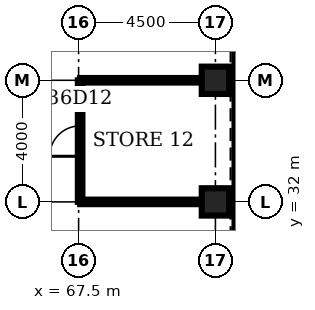
"""IFC4 building model, lengths in metres.
Left out: names, types, materials, properties, quantities, classifications, styles, units other than length and angle.
Written with IfcOpenShell. Run it as: python <this file> out.ifc"""

import sys

from ifc_helpers import new_model, si_unit, direction, frame, frame_2d, origin, origin_2d, place, context, subcontext, project, spatial, rectangle, hollow_rectangle, extrude, element, fill, save


model = new_model("IFC4")
c1 = context("Model", 3, precision=1e-05, world=origin(), true_north=direction((0.0, 1.0)))
c2 = subcontext(c1, "Body", "Model", "MODEL_VIEW")
j1 = project(units=[si_unit("LENGTHUNIT", "METRE"), si_unit("PLANEANGLEUNIT", "RADIAN")], contexts=[c1])
p1 = place(None, origin())
s1 = spatial("IfcSite", under=j1, at=p1, CompositionType="ELEMENT")
p2 = place(p1, origin())
s2 = spatial("IfcBuilding", under=s1, at=p2, CompositionType="ELEMENT")
p3 = place(p2, frame((0.0, 0.0, 163.5)))
s3 = spatial("IfcBuildingStorey", under=s2, at=p3, CompositionType="ELEMENT", Elevation=163.5)
for number, where, z_axis, x_axis in (
    (1, (72.0, 32.0, 0.0), (0.0, 0.0, 1.0), (1.0, 0.0, 0.0)),
    (2, (72.0, 36.0, 0.0), (0.0, 0.0, 1.0), (1.0, 0.0, 0.0)),
):
    element("IfcColumn", number, at=place(p3, frame(where, z_axis=z_axis, x_axis=x_axis)), inside=s3, PredefinedType="COLUMN", context=c2, shape_type="SweptSolid", body=[
        extrude(hollow_rectangle(XDim=0.9, YDim=0.9, WallThickness=0.09, at=origin_2d()), origin(), (0.0, 0.0, 1.0), 4.2),
    ])
for number, where, z_axis, x_axis in (
    (3, (67.55, 32.0, 0.0), (0.0, 0.0, 1.0), (1.0, 0.0, 0.0)),
    (4, (67.55, 36.0, 0.0), (0.0, 0.0, 1.0), (1.0, 0.0, 0.0)),
):
    element("IfcWall", number, at=place(p3, frame(where, z_axis=z_axis, x_axis=x_axis)), inside=s3, PredefinedType="PARTITIONING", context=c2, shape_type="SweptSolid", body=[
        extrude(rectangle(XDim=4.0, YDim=0.15, at=frame_2d((2.0, 0.0))), origin(), (0.0, 0.0, 1.0), 3.0),
    ])
p4 = place(p3, frame((67.55, 32.0, 0.0), z_axis=(0.0, 0.0, 1.0), x_axis=(0.0, 1.0, 0.0)))
e5 = element("IfcWall", 5, at=p4, inside=s3, PredefinedType="PARTITIONING", context=c2, shape_type="SweptSolid", body=[
    extrude(rectangle(XDim=4.0, YDim=0.15, at=frame_2d((2.0, 0.0))), origin(), (0.0, 0.0, 1.0), 3.0),
])
p5 = place(p4, frame((1.5, 0.0, 0.0)))
e6 = element("IfcOpeningElement", 6, at=p5, cuts=e5, PredefinedType="OPENING", context=c2, shape_type="SweptSolid", body=[
    extrude(rectangle(XDim=1.0, YDim=2.1, at=frame_2d((0.5, 1.05))), frame((0.0, 0.085, 0.0), z_axis=(0.0, -1.0, 0.0), x_axis=(1.0, 0.0, 0.0)), (0.0, 0.0, 1.0), 0.17),
])
p6 = place(p5, origin())
e7 = element("IfcDoor", 7, at=p6, inside=s3, OperationType="SINGLE_SWING_LEFT", PredefinedType="DOOR", context=c2, shape_type="SweptSolid", body=[
    extrude(rectangle(XDim=1.0, YDim=2.1, at=frame_2d((0.5, 1.05))), frame((0.0, 0.025, 0.0), z_axis=(0.0, -1.0, 0.0), x_axis=(1.0, 0.0, 0.0)), (0.0, 0.0, 1.0), 0.05),
])
fill(e6, e7)
save(model, sys.argv[1])
